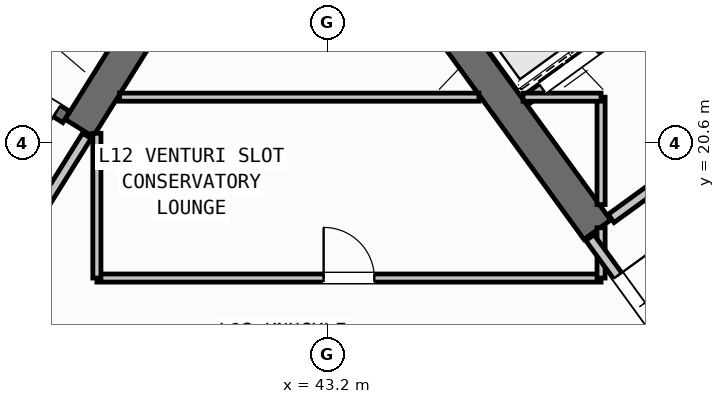
"""IFC4 building model, lengths in metres.
Left out: names, types, materials, properties, quantities, classifications, styles, units other than length and angle.
Written with IfcOpenShell. Run it as: python <this file> out.ifc"""

import sys

from ifc_helpers import new_model, si_unit, direction, frame, frame_2d, origin, place, context, subcontext, project, spatial, rectangle, extrude, source, transform, mapped, element, fill, save


model = new_model("IFC4")
c1 = context("Model", 3, precision=1e-05, world=origin(), true_north=direction((0.0, 1.0)))
c2 = subcontext(c1, "Body", "Model", "MODEL_VIEW")
j1 = project(units=[si_unit("LENGTHUNIT", "METRE"), si_unit("PLANEANGLEUNIT", "RADIAN")], contexts=[c1])
p1 = place(None, origin())
s1 = spatial("IfcSite", under=j1, at=p1, CompositionType="ELEMENT")
p2 = place(p1, origin())
s2 = spatial("IfcBuilding", under=s1, at=p2, CompositionType="ELEMENT")
p3 = place(p2, frame((0.0, 0.0, 49.2)))
s3 = spatial("IfcBuildingStorey", under=s2, at=p3, CompositionType="ELEMENT", Elevation=49.2)
p4 = place(p3, frame((40.168, 23.88, 0.0), z_axis=(0.0, 0.0, 1.0), x_axis=(-0.529893103397, -0.8480644427, 0.0)))
e1 = element("IfcWall", 1, at=p4, inside=s3, PredefinedType="SHEAR", context=c2, shape_type="SweptSolid", body=[
    extrude(rectangle(XDim=3.525, YDim=0.65, at=frame_2d((1.763, 0.0))), origin(), (0.0, 0.0, 1.0), 3.35),
])
p5 = place(p3, frame((48.526, 18.884, 0.0), z_axis=(0.0, 0.0, 1.0), x_axis=(-0.58777996584, 0.809020835181, 0.0)))
e2 = element("IfcWall", 2, at=p5, inside=s3, PredefinedType="SHEAR", context=c2, shape_type="SweptSolid", body=[
    extrude(rectangle(XDim=6.375, YDim=0.65, at=frame_2d((3.188, 0.0))), origin(), (0.0, 0.0, 1.0), 3.35),
])
p6 = place(p3, frame((38.046, 21.108, 0.0), z_axis=(0.0, 0.0, 1.0), x_axis=(-0.848054434086, 0.529909121291, 0.0)))
e3 = element("IfcWall", 3, at=p6, inside=s3, PredefinedType="SHEAR", context=c2, shape_type="SweptSolid", body=[
    extrude(rectangle(XDim=7.33, YDim=0.26, at=frame_2d((3.665, 0.0))), origin(), (0.0, 0.0, 1.0), 3.35),
])
p7 = place(p6, frame((0.22, 0.0, 0.0)))
e4 = element("IfcOpeningElement", 4, at=p7, cuts=e3, PredefinedType="OPENING", context=c2, shape_type="SweptSolid", body=[
    extrude(rectangle(XDim=1.1, YDim=2.1, at=frame_2d((0.55, 1.05))), frame((0.0, 0.14, 0.0), z_axis=(0.0, -1.0, 0.0), x_axis=(1.0, 0.0, 0.0)), (0.0, 0.0, 1.0), 0.28),
])
p8 = place(p3, frame((47.106, 21.437, 0.0), z_axis=(0.0, 0.0, 1.0), x_axis=(0.809012514015, 0.58779141893, 0.0)))
e5 = element("IfcWall", 5, at=p8, inside=s3, PredefinedType="STANDARD", context=c2, shape_type="SweptSolid", body=[
    extrude(rectangle(XDim=3.398, YDim=0.2, at=frame_2d((1.699, 0.0))), origin(), (0.0, 0.0, 1.0), 3.34),
])
p9 = place(p8, frame((0.408, 0.0, 0.0)))
e6 = element("IfcOpeningElement", 6, at=p9, cuts=e5, PredefinedType="OPENING", context=c2, shape_type="SweptSolid", body=[
    extrude(rectangle(XDim=1.3, YDim=2.2, at=frame_2d((0.65, 1.1))), frame((0.0, 0.11, 0.0), z_axis=(0.0, -1.0, 0.0), x_axis=(1.0, 0.0, 0.0)), (0.0, 0.0, 1.0), 0.22),
])
p10 = place(p3, frame((48.799, 19.107, 0.0), z_axis=(0.0, 0.0, 1.0), x_axis=(0.809012959416, 0.587790805897, 0.0)))
e7 = element("IfcWall", 7, at=p10, inside=s3, PredefinedType="STANDARD", context=c2, shape_type="SweptSolid", body=[
    extrude(rectangle(XDim=5.718, YDim=0.2, at=frame_2d((2.859, 0.0))), origin(), (0.0, 0.0, 1.0), 3.34),
])
p11 = place(p10, frame((2.498, 0.0, 0.0)))
e8 = element("IfcOpeningElement", 8, at=p11, cuts=e7, PredefinedType="OPENING", context=c2, shape_type="SweptSolid", body=[
    extrude(rectangle(XDim=1.15, YDim=2.1, at=frame_2d((0.575, 1.05))), frame((0.0, 0.11, 0.0), z_axis=(0.0, -1.0, 0.0), x_axis=(1.0, 0.0, 0.0)), (0.0, 0.0, 1.0), 0.22),
])
p12 = place(p3, frame((38.451, 20.737, 0.0), z_axis=(0.0, 0.0, 1.0), x_axis=(-0.529924799939, -0.848044637038, 0.0)))
e9 = element("IfcWall", 9, at=p12, inside=s3, PredefinedType="STANDARD", context=c2, shape_type="SweptSolid", body=[
    extrude(rectangle(XDim=2.96, YDim=0.2, at=frame_2d((1.48, 0.0))), origin(), (0.0, 0.0, 1.0), 3.34),
])
p13 = place(p12, frame((1.46, 0.0, 0.0)))
e10 = element("IfcOpeningElement", 10, at=p13, cuts=e9, PredefinedType="OPENING", context=c2, shape_type="SweptSolid", body=[
    extrude(rectangle(XDim=0.86, YDim=2.05, at=frame_2d((0.43, 1.025))), frame((0.0, 0.11, 0.0), z_axis=(0.0, -1.0, 0.0), x_axis=(1.0, 0.0, 0.0)), (0.0, 0.0, 1.0), 0.22),
])
p14 = place(p3, frame((38.65, 17.93, 0.0), z_axis=(0.0, 0.0, 1.0), x_axis=(1.0, 0.0, 0.0)))
e11 = element("IfcWall", 11, at=p14, inside=s3, PredefinedType="PARTITIONING", context=c2, shape_type="SweptSolid", body=[
    extrude(rectangle(XDim=9.95, YDim=0.16, at=frame_2d((4.975, 0.0))), origin(), (0.0, 0.0, 1.0), 3.34),
])
p15 = place(p14, frame((4.475, 0.0, 0.0)))
e12 = element("IfcOpeningElement", 12, at=p15, cuts=e11, PredefinedType="OPENING", context=c2, shape_type="SweptSolid", body=[
    extrude(rectangle(XDim=1.0, YDim=2.1, at=frame_2d((0.5, 1.05))), frame((0.0, 0.09, 0.0), z_axis=(0.0, -1.0, 0.0), x_axis=(1.0, 0.0, 0.0)), (0.0, 0.0, 1.0), 0.18),
])
p16 = place(p3, frame((38.65, 17.93, 0.0), z_axis=(0.0, 0.0, 1.0), x_axis=(0.0, 1.0, 0.0)))
e13 = element("IfcWall", 13, at=p16, inside=s3, PredefinedType="PARTITIONING", context=c2, shape_type="SweptSolid", body=[
    extrude(rectangle(XDim=2.857, YDim=0.16, at=frame_2d((1.428, 0.0))), origin(), (0.0, 0.0, 1.0), 3.34),
])
p17 = place(p3, frame((48.6, 17.93, 0.0), z_axis=(0.0, 0.0, 1.0), x_axis=(0.0, 1.0, 0.0)))
e14 = element("IfcWall", 14, at=p17, inside=s3, PredefinedType="PARTITIONING", context=c2, shape_type="SweptSolid", body=[
    extrude(rectangle(XDim=0.993, YDim=0.16, at=frame_2d((0.496, 0.0))), origin(), (0.0, 0.0, 1.0), 3.34),
])
p18 = place(p3, frame((48.6, 19.38, 0.0), z_axis=(0.0, 0.0, 1.0), x_axis=(0.0, 1.0, 0.0)))
e15 = element("IfcWall", 15, at=p18, inside=s3, PredefinedType="PARTITIONING", context=c2, shape_type="SweptSolid", body=[
    extrude(rectangle(XDim=2.12, YDim=0.16, at=frame_2d((1.06, 0.0))), origin(), (0.0, 0.0, 1.0), 3.34),
])
p19 = place(p3, frame((39.095, 21.5, 0.0), z_axis=(0.0, 0.0, 1.0), x_axis=(1.0, 0.0, 0.0)))
e16 = element("IfcWall", 16, at=p19, inside=s3, PredefinedType="PARTITIONING", context=c2, shape_type="SweptSolid", body=[
    extrude(rectangle(XDim=7.094, YDim=0.16, at=frame_2d((3.547, 0.0))), origin(), (0.0, 0.0, 1.0), 3.34),
])
p20 = place(p3, frame((47.06, 21.5, 0.0), z_axis=(0.0, 0.0, 1.0), x_axis=(1.0, 0.0, 0.0)))
e17 = element("IfcWall", 17, at=p20, inside=s3, PredefinedType="PARTITIONING", context=c2, shape_type="SweptSolid", body=[
    extrude(rectangle(XDim=1.54, YDim=0.16, at=frame_2d((0.77, 0.0))), origin(), (0.0, 0.0, 1.0), 3.34),
])
p21 = place(p3, frame((50.119, 16.333, 0.0), z_axis=(0.0, 0.0, 1.0), x_axis=(-0.587749856981, 0.809042709391, 0.0)))
e18 = element("IfcWall", 18, at=p21, inside=s3, PredefinedType="STANDARD", context=c2, shape_type="SweptSolid", body=[
    extrude(rectangle(XDim=2.96, YDim=0.2, at=frame_2d((1.48, 0.0))), origin(), (0.0, 0.0, 1.0), 3.34),
])
p22 = place(p21, frame((0.53, 0.0, 0.0)))
e19 = element("IfcOpeningElement", 19, at=p22, cuts=e18, PredefinedType="OPENING", context=c2, shape_type="SweptSolid", body=[
    extrude(rectangle(XDim=1.5, YDim=2.15, at=frame_2d((0.75, 1.075))), frame((0.0, 0.11, 0.0), z_axis=(0.0, -1.0, 0.0), x_axis=(1.0, 0.0, 0.0)), (0.0, 0.0, 1.0), 0.22),
])
m1 = source(origin(), c2, "Body", "SweptSolid", [
    extrude(rectangle(XDim=1.1, YDim=2.1, at=frame_2d((0.55, 1.05))), frame((0.0, 0.025, 0.0), z_axis=(0.0, -1.0, 0.0), x_axis=(1.0, 0.0, 0.0)), (0.0, 0.0, 1.0), 0.05),
])
p23 = place(p7, origin())
e20 = element("IfcDoor", 20, at=p23, inside=s3, OperationType="SINGLE_SWING_LEFT", PredefinedType="DOOR", context=c2, shape_type="MappedRepresentation", body=[
    mapped(m1, transform((0.0, 0.0, 0.0), scale=1.0)),
])
fill(e4, e20)
m2 = source(origin(), c2, "Body", "SweptSolid", [
    extrude(rectangle(XDim=1.3, YDim=2.2, at=frame_2d((0.65, 1.1))), frame((0.0, 0.025, 0.0), z_axis=(0.0, -1.0, 0.0), x_axis=(1.0, 0.0, 0.0)), (0.0, 0.0, 1.0), 0.05),
])
p24 = place(p9, origin())
e21 = element("IfcDoor", 21, at=p24, inside=s3, OperationType="DOUBLE_DOOR_SLIDING", PredefinedType="DOOR", context=c2, shape_type="MappedRepresentation", body=[
    mapped(m2, transform((0.0, 0.0, 0.0), scale=1.0)),
])
fill(e6, e21)
m3 = source(origin(), c2, "Body", "SweptSolid", [
    extrude(rectangle(XDim=1.0, YDim=2.1, at=frame_2d((0.5, 1.05))), frame((0.0, 0.025, 0.0), z_axis=(0.0, -1.0, 0.0), x_axis=(1.0, 0.0, 0.0)), (0.0, 0.0, 1.0), 0.05),
])
p25 = place(p15, origin())
e22 = element("IfcDoor", 22, at=p25, inside=s3, OperationType="SINGLE_SWING_LEFT", PredefinedType="DOOR", context=c2, shape_type="MappedRepresentation", body=[
    mapped(m3, transform((0.0, 0.0, 0.0), scale=1.0)),
])
fill(e12, e22)
m4 = source(origin(), c2, "Body", "SweptSolid", [
    extrude(rectangle(XDim=1.5, YDim=2.15, at=frame_2d((0.75, 1.075))), frame((0.0, 0.025, 0.0), z_axis=(0.0, -1.0, 0.0), x_axis=(1.0, 0.0, 0.0)), (0.0, 0.0, 1.0), 0.05),
])
p26 = place(p22, frame((1.5, 0.0, 0.0), z_axis=(0.0, 0.0, 1.0), x_axis=(-1.0, 0.0, 0.0)))
e23 = element("IfcDoor", 23, at=p26, inside=s3, OperationType="DOUBLE_DOOR_SINGLE_SWING", PredefinedType="DOOR", context=c2, shape_type="MappedRepresentation", body=[
    mapped(m4, transform((0.0, 0.0, 0.0), scale=1.0)),
])
fill(e19, e23)
save(model, sys.argv[1])
